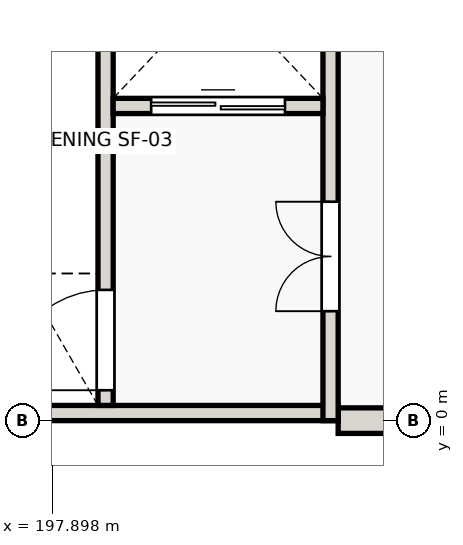
"""IFC4 building model, lengths in metres.
Left out: names, types, materials, properties, quantities, classifications, styles, units other than length and angle.
Written with IfcOpenShell. Run it as: python <this file> out.ifc"""

import sys

from ifc_helpers import new_model, si_unit, direction, frame, frame_2d, origin, place, context, subcontext, project, spatial, rectangle, extrude, element, fill, save


model = new_model("IFC4")
c1 = context("Model", 3, precision=1e-05, world=origin(), true_north=direction((0.0, 1.0)))
c2 = subcontext(c1, "Body", "Model", "MODEL_VIEW")
j1 = project(units=[si_unit("LENGTHUNIT", "METRE"), si_unit("PLANEANGLEUNIT", "RADIAN")], contexts=[c1])
p1 = place(None, origin())
s1 = spatial("IfcSite", under=j1, at=p1, CompositionType="ELEMENT")
p2 = place(p1, origin())
s2 = spatial("IfcBuilding", under=s1, at=p2, CompositionType="ELEMENT")
p3 = place(p2, frame((0.0, 0.0, 4.2)))
s3 = spatial("IfcBuildingStorey", under=s2, at=p3, CompositionType="ELEMENT", Elevation=4.2)
p4 = place(p3, frame((204.0, 0.0, 0.0), z_axis=(0.0, 0.0, 1.0), x_axis=(-1.0, 0.0, 0.0)))
e1 = element("IfcWall", 1, at=p4, inside=s3, PredefinedType="SOLIDWALL", context=c2, shape_type="SweptSolid", body=[
    extrude(rectangle(XDim=1.4, YDim=0.42, at=frame_2d((0.7, 0.0))), origin(), (0.0, 0.0, 1.0), 3.57),
])
p5 = place(p3, frame((202.6, 0.125, 0.0), z_axis=(0.0, 0.0, 1.0), x_axis=(-1.0, 0.0, 0.0)))
e2 = element("IfcWall", 2, at=p5, inside=s3, PredefinedType="SHEAR", context=c2, shape_type="SweptSolid", body=[
    extrude(rectangle(XDim=9.2, YDim=0.25, at=frame_2d((4.6, 0.0))), origin(), (0.0, 0.0, 1.0), 5.6),
])
p6 = place(p3, frame((202.475, 0.0, 0.0), z_axis=(0.0, 0.0, 1.0), x_axis=(0.0, 1.0, 0.0)))
e3 = element("IfcWall", 3, at=p6, inside=s3, PredefinedType="SHEAR", context=c2, shape_type="SweptSolid", body=[
    extrude(rectangle(XDim=9.2, YDim=0.25, at=frame_2d((4.6, 0.0))), origin(), (0.0, 0.0, 1.0), 5.6),
])
p7 = place(p6, frame((1.8, 0.0, 0.0)))
e4 = element("IfcOpeningElement", 4, at=p7, cuts=e3, PredefinedType="OPENING", context=c2, shape_type="SweptSolid", body=[
    extrude(rectangle(XDim=1.8, YDim=2.15, at=frame_2d((0.9, 1.075))), frame((0.0, 0.135, 0.0), z_axis=(0.0, -1.0, 0.0), x_axis=(1.0, 0.0, 0.0)), (0.0, 0.0, 1.0), 0.27),
])
p8 = place(p3, frame((198.775, 0.25, 0.0), z_axis=(0.0, 0.0, 1.0), x_axis=(0.0, 1.0, 0.0)))
e5 = element("IfcWall", 5, at=p8, inside=s3, PredefinedType="SHEAR", context=c2, shape_type="SweptSolid", body=[
    extrude(rectangle(XDim=8.7, YDim=0.25, at=frame_2d((4.35, 0.0))), origin(), (0.0, 0.0, 1.0), 5.6),
])
p9 = place(p8, frame((0.25, 0.0, 0.0)))
e6 = element("IfcOpeningElement", 6, at=p9, cuts=e5, PredefinedType="OPENING", context=c2, shape_type="SweptSolid", body=[
    extrude(rectangle(XDim=1.65, YDim=2.1, at=frame_2d((0.825, 1.05))), frame((0.0, 0.135, 0.0), z_axis=(0.0, -1.0, 0.0), x_axis=(1.0, 0.0, 0.0)), (0.0, 0.0, 1.0), 0.27),
])
p10 = place(p3, frame((198.9, 5.175, 0.0), z_axis=(0.0, 0.0, 1.0), x_axis=(1.0, 0.0, 0.0)))
e7 = element("IfcWall", 7, at=p10, inside=s3, PredefinedType="SHEAR", context=c2, shape_type="SweptSolid", body=[
    extrude(rectangle(XDim=3.45, YDim=0.25, at=frame_2d((1.725, 0.0))), origin(), (0.0, 0.0, 1.0), 5.6),
])
p11 = place(p10, frame((0.625, 0.0, 0.0)))
e8 = element("IfcOpeningElement", 8, at=p11, cuts=e7, PredefinedType="OPENING", context=c2, shape_type="SweptSolid", body=[
    extrude(rectangle(XDim=2.2, YDim=2.35, at=frame_2d((1.1, 1.175))), frame((0.0, 0.135, 0.0), z_axis=(0.0, -1.0, 0.0), x_axis=(1.0, 0.0, 0.0)), (0.0, 0.0, 1.0), 0.27),
])
p12 = place(p7, origin())
e9 = element("IfcDoor", 9, at=p12, inside=s3, OperationType="DOUBLE_DOOR_SINGLE_SWING", PredefinedType="DOOR", context=c2, shape_type="SweptSolid", body=[
    extrude(rectangle(XDim=1.8, YDim=2.15, at=frame_2d((0.9, 1.075))), frame((0.0, 0.025, 0.0), z_axis=(0.0, -1.0, 0.0), x_axis=(1.0, 0.0, 0.0)), (0.0, 0.0, 1.0), 0.05),
])
fill(e4, e9)
p13 = place(p9, origin())
e10 = element("IfcDoor", 10, at=p13, inside=s3, OperationType="SINGLE_SWING_LEFT", PredefinedType="DOOR", context=c2, shape_type="SweptSolid", body=[
    extrude(rectangle(XDim=1.65, YDim=2.1, at=frame_2d((0.825, 1.05))), frame((0.0, 0.025, 0.0), z_axis=(0.0, -1.0, 0.0), x_axis=(1.0, 0.0, 0.0)), (0.0, 0.0, 1.0), 0.05),
])
fill(e6, e10)
p14 = place(p11, origin())
e11 = element("IfcDoor", 11, at=p14, inside=s3, OperationType="SLIDING_TO_LEFT", PredefinedType="DOOR", context=c2, shape_type="SweptSolid", body=[
    extrude(rectangle(XDim=2.2, YDim=2.35, at=frame_2d((1.1, 1.175))), frame((0.0, 0.025, 0.0), z_axis=(0.0, -1.0, 0.0), x_axis=(1.0, 0.0, 0.0)), (0.0, 0.0, 1.0), 0.05),
])
fill(e8, e11)
save(model, sys.argv[1])
